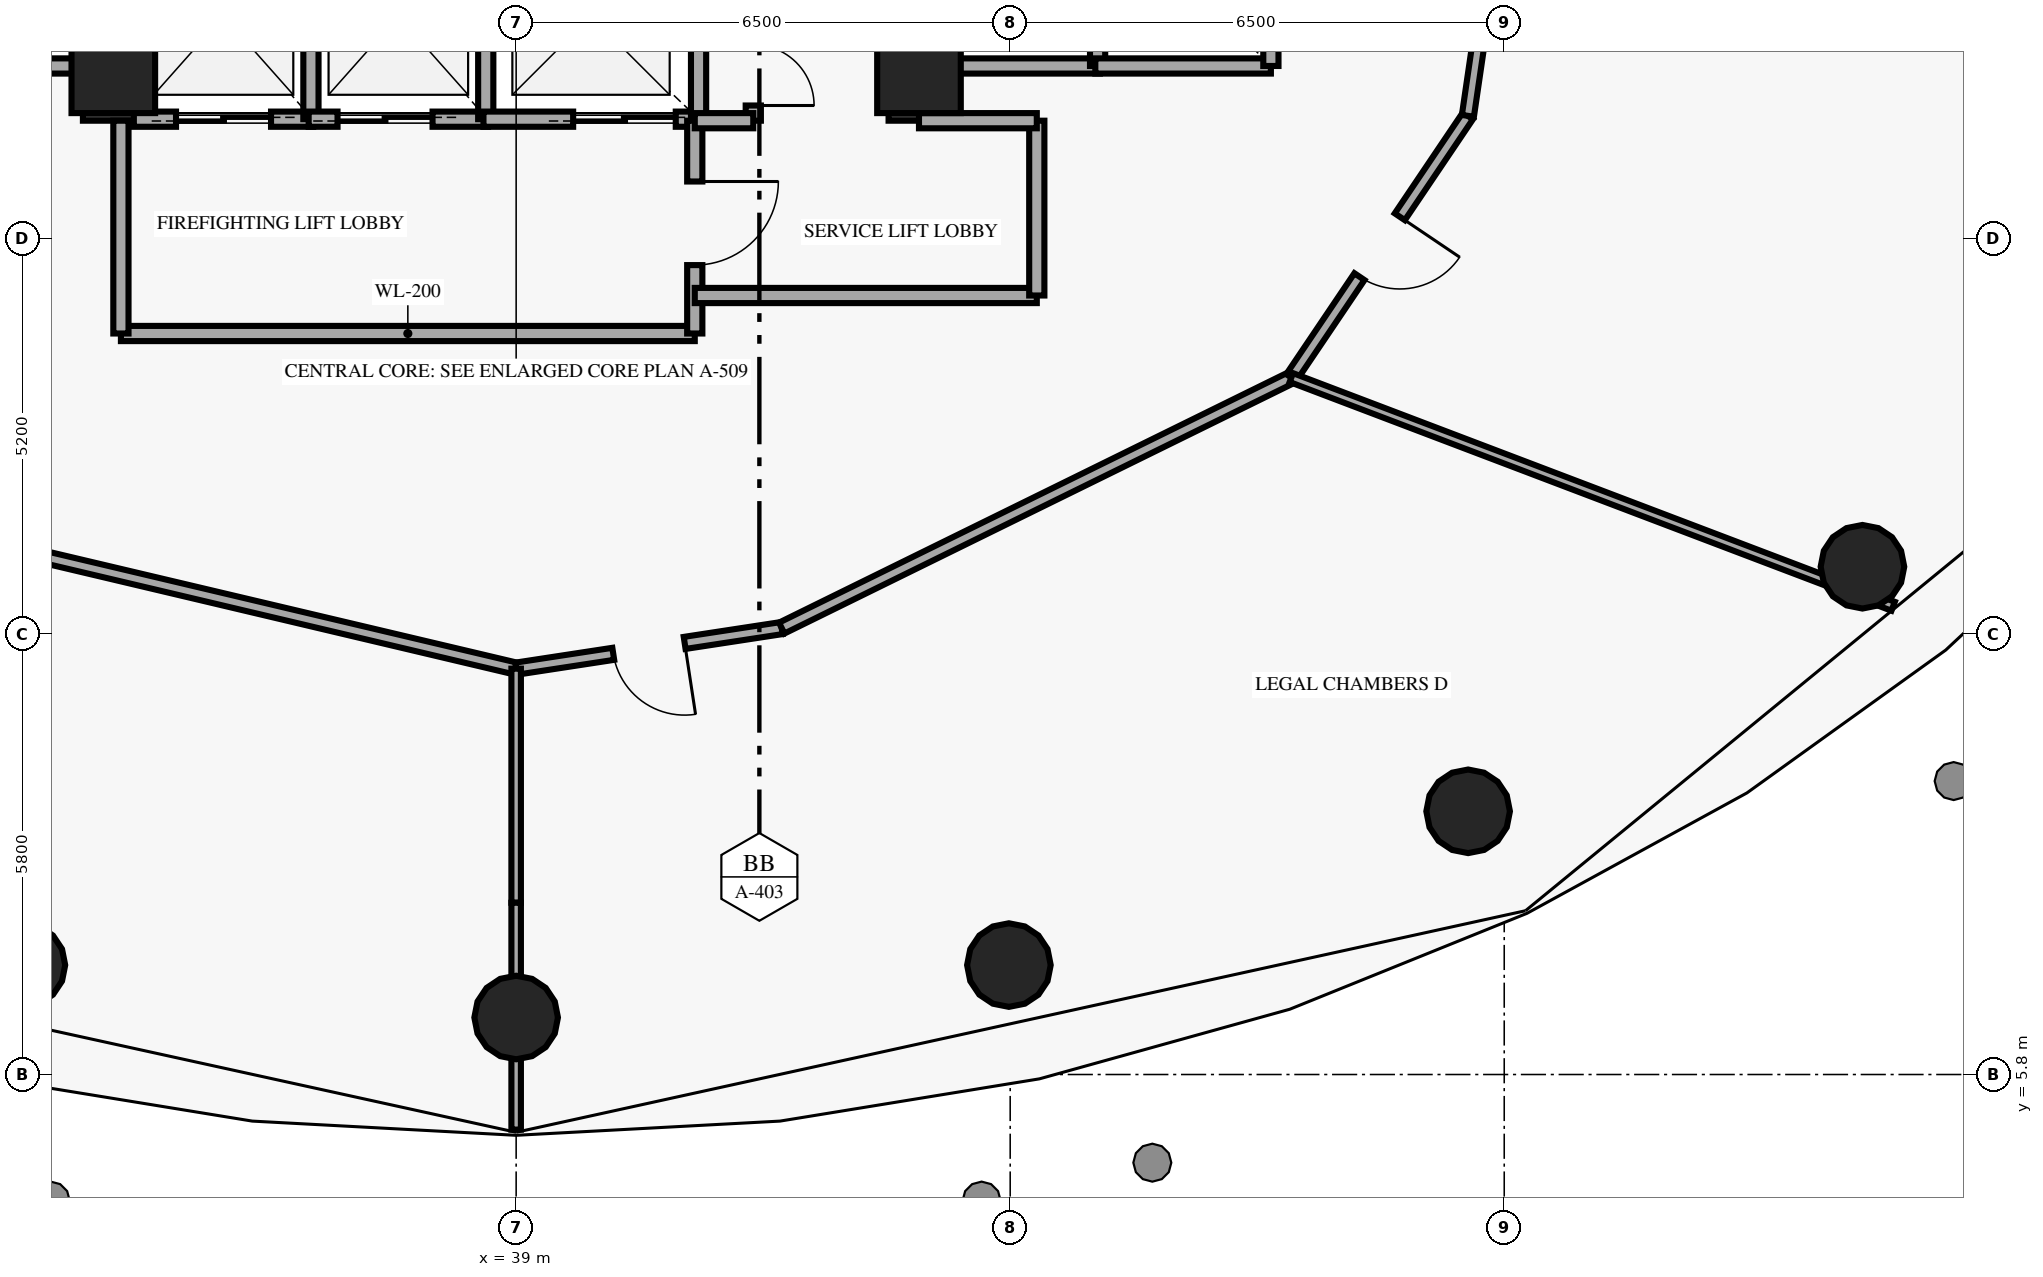
"""IFC4 building model, lengths in metres.
Left out: names, types, materials, properties, quantities, classifications, styles, units other than length and angle.
Written with IfcOpenShell. Run it as: python <this file> out.ifc"""

import sys

from ifc_helpers import new_model, si_unit, direction, frame, frame_2d, origin, origin_2d, place, context, subcontext, project, spatial, rectangle, circle, extrude, element, fill, save


model = new_model("IFC4")
c1 = context("Model", 3, precision=1e-05, world=origin(), true_north=direction((0.0, 1.0)))
c2 = subcontext(c1, "Body", "Model", "MODEL_VIEW")
j1 = project(units=[si_unit("LENGTHUNIT", "METRE"), si_unit("PLANEANGLEUNIT", "RADIAN")], contexts=[c1])
p1 = place(None, origin())
s1 = spatial("IfcSite", under=j1, at=p1, CompositionType="ELEMENT")
p2 = place(p1, origin())
s2 = spatial("IfcBuilding", under=s1, at=p2, CompositionType="ELEMENT")
p3 = place(p2, frame((0.0, 0.0, 53.4)))
s3 = spatial("IfcBuildingStorey", under=s2, at=p3, CompositionType="ELEMENT", Elevation=53.4)
for number, where, z_axis, x_axis in (
    (1, (33.7, 19.0, 0.0), (0.0, 0.0, 1.0), (1.0, 0.0, 0.0)),
    (2, (44.3, 19.0, 0.0), (0.0, 0.0, 1.0), (1.0, 0.0, 0.0)),
):
    element("IfcColumn", number, at=place(p3, frame(where, z_axis=z_axis, x_axis=x_axis)), inside=s3, PredefinedType="PILASTER", context=c2, shape_type="SweptSolid", body=[
        extrude(rectangle(XDim=1.1, YDim=1.1, at=origin_2d()), origin(), (0.0, 0.0, 1.0), 3.8),
    ])
for number, where, z_axis, x_axis in (
    (3, (32.517, 7.24, 0.0), (0.0, 0.0, 1.0), (1.0, 0.0, 0.0)),
    (4, (39.0, 6.55, 0.0), (0.0, 0.0, 1.0), (1.0, 0.0, 0.0)),
    (5, (45.483, 7.24, 0.0), (0.0, 0.0, 1.0), (1.0, 0.0, 0.0)),
    (6, (51.525, 9.263, 0.0), (0.0, 0.0, 1.0), (1.0, 0.0, 0.0)),
    (7, (56.713, 12.481, 0.0), (0.0, 0.0, 1.0), (1.0, 0.0, 0.0)),
):
    element("IfcColumn", number, at=place(p3, frame(where, z_axis=z_axis, x_axis=x_axis)), inside=s3, PredefinedType="COLUMN", context=c2, shape_type="SweptSolid", body=[
        extrude(circle(Radius=0.55, at=origin_2d()), origin(), (0.0, 0.0, 1.0), 3.8),
    ])
for number, where, z_axis, x_axis in (
    (8, (33.7, 18.35, 0.0), (0.0, 0.0, 1.0), (0.0, 1.0, 0.0)),
    (9, (44.3, 18.35, 0.0), (0.0, 0.0, 1.0), (0.0, 1.0, 0.0)),
):
    element("IfcWall", number, at=place(p3, frame(where, z_axis=z_axis, x_axis=x_axis)), inside=s3, PredefinedType="SHEAR", context=c2, shape_type="SweptSolid", body=[
        extrude(rectangle(XDim=2.95, YDim=0.8, at=frame_2d((1.475, 0.0))), origin(), (0.0, 0.0, 1.0), 3.8),
    ])
for number, where, z_axis, x_axis in (
    (10, (31.32, 19.07, 0.0), (0.0, 0.0, 1.0), (1.0, 0.0, 0.0)),
    (11, (44.57, 19.07, 0.0), (0.0, 0.0, 1.0), (1.0, 0.0, 0.0)),
):
    element("IfcWall", number, at=place(p3, frame(where, z_axis=z_axis, x_axis=x_axis)), inside=s3, PredefinedType="SOLIDWALL", context=c2, shape_type="SweptSolid", body=[
        extrude(rectangle(XDim=2.11, YDim=0.2, at=frame_2d((1.055, 0.0))), origin(), (0.0, 0.0, 1.0), 3.8),
    ])
for number, where, z_axis, x_axis in (
    (12, (46.65, 19.07, 0.0), (0.0, 0.0, 1.0), (0.0, 1.0, 0.0)),
    (13, (46.62, 19.07, 0.0), (0.0, 0.0, 1.0), (1.0, 0.0, 0.0)),
    (14, (48.93, 19.07, 0.0), (0.0, 0.0, 1.0), (0.0, 1.0, 0.0)),
):
    element("IfcWall", number, at=place(p3, frame(where, z_axis=z_axis, x_axis=x_axis)), inside=s3, PredefinedType="SOLIDWALL", context=c2, shape_type="SweptSolid", body=[
        extrude(rectangle(XDim=2.31, YDim=0.2, at=frame_2d((1.155, 0.0))), origin(), (0.0, 0.0, 1.0), 3.8),
    ])
p4 = place(p3, frame((33.97, 18.37, 0.0), z_axis=(0.0, 0.0, 1.0), x_axis=(1.0, 0.0, 0.0)))
e15 = element("IfcWall", 15, at=p4, inside=s3, PredefinedType="SOLIDWALL", context=c2, shape_type="SweptSolid", body=[
    extrude(rectangle(XDim=2.36, YDim=0.2, at=frame_2d((1.18, 0.0))), origin(), (0.0, 0.0, 1.0), 3.8),
])
p5 = place(p4, frame((0.555, 0.0, 0.0)))
e16 = element("IfcOpeningElement", 16, at=p5, cuts=e15, PredefinedType="OPENING", context=c2, shape_type="SweptSolid", body=[
    extrude(rectangle(XDim=1.25, YDim=2.2, at=frame_2d((0.625, 1.1))), frame((0.0, 0.11, 0.0), z_axis=(0.0, -1.0, 0.0), x_axis=(1.0, 0.0, 0.0)), (0.0, 0.0, 1.0), 0.22),
])
p6 = place(p3, frame((36.3, 18.37, 0.0), z_axis=(0.0, 0.0, 1.0), x_axis=(0.0, 1.0, 0.0)))
e17 = element("IfcWall", 17, at=p6, inside=s3, PredefinedType="SOLIDWALL", context=c2, shape_type="SweptSolid", body=[
    extrude(rectangle(XDim=2.71, YDim=0.2, at=frame_2d((1.355, 0.0))), origin(), (0.0, 0.0, 1.0), 3.8),
])
p7 = place(p3, frame((36.27, 18.37, 0.0), z_axis=(0.0, 0.0, 1.0), x_axis=(1.0, 0.0, 0.0)))
e18 = element("IfcWall", 18, at=p7, inside=s3, PredefinedType="SOLIDWALL", context=c2, shape_type="SweptSolid", body=[
    extrude(rectangle(XDim=2.36, YDim=0.2, at=frame_2d((1.18, 0.0))), origin(), (0.0, 0.0, 1.0), 3.8),
])
p8 = place(p7, frame((0.38, 0.0, 0.0)))
e19 = element("IfcOpeningElement", 19, at=p8, cuts=e18, PredefinedType="OPENING", context=c2, shape_type="SweptSolid", body=[
    extrude(rectangle(XDim=1.25, YDim=2.2, at=frame_2d((0.625, 1.1))), frame((0.0, 0.11, 0.0), z_axis=(0.0, -1.0, 0.0), x_axis=(1.0, 0.0, 0.0)), (0.0, 0.0, 1.0), 0.22),
])
p9 = place(p3, frame((38.6, 18.37, 0.0), z_axis=(0.0, 0.0, 1.0), x_axis=(0.0, 1.0, 0.0)))
e20 = element("IfcWall", 20, at=p9, inside=s3, PredefinedType="SOLIDWALL", context=c2, shape_type="SweptSolid", body=[
    extrude(rectangle(XDim=2.71, YDim=0.2, at=frame_2d((1.355, 0.0))), origin(), (0.0, 0.0, 1.0), 3.8),
])
p10 = place(p3, frame((38.57, 18.37, 0.0), z_axis=(0.0, 0.0, 1.0), x_axis=(1.0, 0.0, 0.0)))
e21 = element("IfcWall", 21, at=p10, inside=s3, PredefinedType="SOLIDWALL", context=c2, shape_type="SweptSolid", body=[
    extrude(rectangle(XDim=2.83, YDim=0.2, at=frame_2d((1.415, 0.0))), origin(), (0.0, 0.0, 1.0), 3.8),
])
p11 = place(p10, frame((1.18, 0.0, 0.0)))
e22 = element("IfcOpeningElement", 22, at=p11, cuts=e21, PredefinedType="OPENING", context=c2, shape_type="SweptSolid", body=[
    extrude(rectangle(XDim=1.35, YDim=2.18, at=frame_2d((0.675, 1.09))), frame((0.0, 0.11, 0.0), z_axis=(0.0, -1.0, 0.0), x_axis=(1.0, 0.0, 0.0)), (0.0, 0.0, 1.0), 0.22),
])
p12 = place(p3, frame((41.4, 18.37, 0.0), z_axis=(0.0, 0.0, 1.0), x_axis=(0.0, 1.0, 0.0)))
e23 = element("IfcWall", 23, at=p12, inside=s3, PredefinedType="SOLIDWALL", context=c2, shape_type="SweptSolid", body=[
    extrude(rectangle(XDim=2.71, YDim=0.2, at=frame_2d((1.355, 0.0))), origin(), (0.0, 0.0, 1.0), 3.8),
])
p13 = place(p3, frame((33.8, 15.55, 0.0), z_axis=(0.0, 0.0, 1.0), x_axis=(1.0, 0.0, 0.0)))
e24 = element("IfcWall", 24, at=p13, inside=s3, PredefinedType="SOLIDWALL", context=c2, shape_type="SweptSolid", body=[
    extrude(rectangle(XDim=7.55, YDim=0.2, at=frame_2d((3.775, 0.0))), origin(), (0.0, 0.0, 1.0), 3.8),
])
p14 = place(p3, frame((33.8, 15.55, 0.0), z_axis=(0.0, 0.0, 1.0), x_axis=(0.0, 1.0, 0.0)))
e25 = element("IfcWall", 25, at=p14, inside=s3, PredefinedType="SOLIDWALL", context=c2, shape_type="SweptSolid", body=[
    extrude(rectangle(XDim=2.8, YDim=0.2, at=frame_2d((1.4, 0.0))), origin(), (0.0, 0.0, 1.0), 3.8),
])
p15 = place(p3, frame((41.35, 15.55, 0.0), z_axis=(0.0, 0.0, 1.0), x_axis=(0.0, 1.0, 0.0)))
e26 = element("IfcWall", 26, at=p15, inside=s3, PredefinedType="SOLIDWALL", context=c2, shape_type="SweptSolid", body=[
    extrude(rectangle(XDim=2.8, YDim=0.2, at=frame_2d((1.4, 0.0))), origin(), (0.0, 0.0, 1.0), 3.8),
])
p16 = place(p15, frame((0.9, 0.0, 0.0)))
e27 = element("IfcOpeningElement", 27, at=p16, cuts=e26, PredefinedType="OPENING", context=c2, shape_type="SweptSolid", body=[
    extrude(rectangle(XDim=1.1, YDim=2.15, at=frame_2d((0.55, 1.075))), frame((0.0, 0.11, 0.0), z_axis=(0.0, -1.0, 0.0), x_axis=(1.0, 0.0, 0.0)), (0.0, 0.0, 1.0), 0.22),
])
p17 = place(p3, frame((41.35, 16.05, 0.0), z_axis=(0.0, 0.0, 1.0), x_axis=(1.0, 0.0, 0.0)))
e28 = element("IfcWall", 28, at=p17, inside=s3, PredefinedType="SOLIDWALL", context=c2, shape_type="SweptSolid", body=[
    extrude(rectangle(XDim=4.5, YDim=0.2, at=frame_2d((2.25, 0.0))), origin(), (0.0, 0.0, 1.0), 3.8),
])
p18 = place(p3, frame((45.85, 16.05, 0.0), z_axis=(0.0, 0.0, 1.0), x_axis=(0.0, 1.0, 0.0)))
e29 = element("IfcWall", 29, at=p18, inside=s3, PredefinedType="SOLIDWALL", context=c2, shape_type="SweptSolid", body=[
    extrude(rectangle(XDim=2.3, YDim=0.2, at=frame_2d((1.15, 0.0))), origin(), (0.0, 0.0, 1.0), 3.8),
])
p19 = place(p3, frame((44.3, 18.35, 0.0), z_axis=(0.0, 0.0, 1.0), x_axis=(1.0, 0.0, 0.0)))
e30 = element("IfcWall", 30, at=p19, inside=s3, PredefinedType="SOLIDWALL", context=c2, shape_type="SweptSolid", body=[
    extrude(rectangle(XDim=1.55, YDim=0.2, at=frame_2d((0.775, 0.0))), origin(), (0.0, 0.0, 1.0), 3.8),
])
p20 = place(p3, frame((42.12, 18.35, 0.0), z_axis=(0.0, 0.0, 1.0), x_axis=(0.0, 1.0, 0.0)))
e31 = element("IfcWall", 31, at=p20, inside=s3, PredefinedType="SOLIDWALL", context=c2, shape_type="SweptSolid", body=[
    extrude(rectangle(XDim=2.95, YDim=0.2, at=frame_2d((1.475, 0.0))), origin(), (0.0, 0.0, 1.0), 3.8),
])
p21 = place(p20, frame((0.2, 0.0, 0.0)))
e32 = element("IfcOpeningElement", 32, at=p21, cuts=e31, PredefinedType="OPENING", context=c2, shape_type="SweptSolid", body=[
    extrude(rectangle(XDim=0.8, YDim=2.05, at=frame_2d((0.4, 1.025))), frame((0.0, 0.11, 0.0), z_axis=(0.0, -1.0, 0.0), x_axis=(1.0, 0.0, 0.0)), (0.0, 0.0, 1.0), 0.22),
])
p22 = place(p3, frame((41.35, 18.35, 0.0), z_axis=(0.0, 0.0, 1.0), x_axis=(1.0, 0.0, 0.0)))
e33 = element("IfcWall", 33, at=p22, inside=s3, PredefinedType="SOLIDWALL", context=c2, shape_type="SweptSolid", body=[
    extrude(rectangle(XDim=0.77, YDim=0.2, at=frame_2d((0.385, 0.0))), origin(), (0.0, 0.0, 1.0), 3.8),
])
p23 = place(p3, frame((32.027, 12.79, 0.0), z_axis=(0.0, 0.0, 1.0), x_axis=(0.973121894952, -0.230290637162, 0.0)))
e34 = element("IfcWall", 34, at=p23, inside=s3, PredefinedType="PARTITIONING", context=c2, shape_type="SweptSolid", body=[
    extrude(rectangle(XDim=7.166, YDim=0.16, at=frame_2d((3.583, 0.0))), origin(), (0.0, 0.0, 1.0), 3.8),
])
p24 = place(p3, frame((42.494, 11.674, 0.0), z_axis=(0.0, 0.0, 1.0), x_axis=(-0.988513405878, -0.151133207467, 0.0)))
e35 = element("IfcWall", 35, at=p24, inside=s3, PredefinedType="PARTITIONING", context=c2, shape_type="SweptSolid", body=[
    extrude(rectangle(XDim=3.534, YDim=0.16, at=frame_2d((1.767, 0.0))), origin(), (0.0, 0.0, 1.0), 3.8),
])
p25 = place(p24, frame((1.292, 0.0, 0.0)))
e36 = element("IfcOpeningElement", 36, at=p25, cuts=e35, PredefinedType="OPENING", context=c2, shape_type="SweptSolid", body=[
    extrude(rectangle(XDim=0.95, YDim=2.15, at=frame_2d((0.475, 1.075))), frame((0.0, 0.09, 0.0), z_axis=(0.0, -1.0, 0.0), x_axis=(1.0, 0.0, 0.0)), (0.0, 0.0, 1.0), 0.18),
])
p26 = place(p3, frame((42.494, 11.674, 0.0), z_axis=(0.0, 0.0, 1.0), x_axis=(0.897439047431, 0.441138477291, 0.0)))
e37 = element("IfcWall", 37, at=p26, inside=s3, PredefinedType="PARTITIONING", context=c2, shape_type="SweptSolid", body=[
    extrude(rectangle(XDim=7.471, YDim=0.16, at=frame_2d((3.736, 0.0))), origin(), (0.0, 0.0, 1.0), 3.8),
])
p27 = place(p3, frame((51.522, 18.414, 0.0), z_axis=(0.0, 0.0, 1.0), x_axis=(-0.559181123292, -0.829045518264, 0.0)))
e38 = element("IfcWall", 38, at=p27, inside=s3, PredefinedType="PARTITIONING", context=c2, shape_type="SweptSolid", body=[
    extrude(rectangle(XDim=4.154, YDim=0.16, at=frame_2d((2.077, 0.0))), origin(), (0.0, 0.0, 1.0), 3.8),
])
p28 = place(p27, frame((1.602, 0.0, 0.0)))
e39 = element("IfcOpeningElement", 39, at=p28, cuts=e38, PredefinedType="OPENING", context=c2, shape_type="SweptSolid", body=[
    extrude(rectangle(XDim=0.95, YDim=2.15, at=frame_2d((0.475, 1.075))), frame((0.0, 0.09, 0.0), z_axis=(0.0, -1.0, 0.0), x_axis=(1.0, 0.0, 0.0)), (0.0, 0.0, 1.0), 0.18),
])
p29 = place(p3, frame((51.522, 18.414, 0.0), z_axis=(0.0, 0.0, 1.0), x_axis=(0.14489272673, 0.989447369869, 0.0)))
e40 = element("IfcWall", 40, at=p29, inside=s3, PredefinedType="PARTITIONING", context=c2, shape_type="SweptSolid", body=[
    extrude(rectangle(XDim=8.475, YDim=0.16, at=frame_2d((4.238, 0.0))), origin(), (0.0, 0.0, 1.0), 3.8),
])
p30 = place(p3, frame((39.0, 11.14, 0.0), z_axis=(0.0, 0.0, 1.0), x_axis=(0.0, -1.0, 0.0)))
e41 = element("IfcWall", 41, at=p30, inside=s3, PredefinedType="PARTITIONING", context=c2, shape_type="SweptSolid", body=[
    extrude(rectangle(XDim=3.08, YDim=0.125, at=frame_2d((1.54, 0.0))), origin(), (0.0, 0.0, 1.0), 3.8),
])
p31 = place(p3, frame((39.0, 8.06, 0.0), z_axis=(0.0, 0.0, 1.0), x_axis=(0.0, -1.0, 0.0)))
e42 = element("IfcWall", 42, at=p31, inside=s3, PredefinedType="PARTITIONING", context=c2, shape_type="SweptSolid", body=[
    extrude(rectangle(XDim=1.519, YDim=0.125, at=frame_2d((0.76, 0.0))), origin(), (0.0, 0.0, 1.0), 2.94),
])
p32 = place(p3, frame((39.0, 6.541, 0.0), z_axis=(0.0, 0.0, 1.0), x_axis=(0.0, -1.0, 0.0)))
e43 = element("IfcWall", 43, at=p32, inside=s3, PredefinedType="PARTITIONING", context=c2, shape_type="SweptSolid", body=[
    extrude(rectangle(XDim=1.466, YDim=0.125, at=frame_2d((0.733, 0.0))), origin(), (0.0, 0.0, 1.0), 3.8),
])
p33 = place(p3, frame((49.199, 14.97, 0.0), z_axis=(0.0, 0.0, 1.0), x_axis=(0.934775541041, -0.355238916605, 0.0)))
e44 = element("IfcWall", 44, at=p33, inside=s3, PredefinedType="PARTITIONING", context=c2, shape_type="SweptSolid", body=[
    extrude(rectangle(XDim=8.47, YDim=0.125, at=frame_2d((4.235, 0.0))), origin(), (0.0, 0.0, 1.0), 3.8),
])
p34 = place(p5, origin())
e45 = element("IfcDoor", 45, at=p34, inside=s3, OperationType="DOUBLE_DOOR_SLIDING", PredefinedType="DOOR", context=c2, shape_type="SweptSolid", body=[
    extrude(rectangle(XDim=1.25, YDim=2.2, at=frame_2d((0.625, 1.1))), frame((0.0, 0.025, 0.0), z_axis=(0.0, -1.0, 0.0), x_axis=(1.0, 0.0, 0.0)), (0.0, 0.0, 1.0), 0.05),
])
fill(e16, e45)
p35 = place(p8, origin())
e46 = element("IfcDoor", 46, at=p35, inside=s3, OperationType="DOUBLE_DOOR_SLIDING", PredefinedType="DOOR", context=c2, shape_type="SweptSolid", body=[
    extrude(rectangle(XDim=1.25, YDim=2.2, at=frame_2d((0.625, 1.1))), frame((0.0, 0.025, 0.0), z_axis=(0.0, -1.0, 0.0), x_axis=(1.0, 0.0, 0.0)), (0.0, 0.0, 1.0), 0.05),
])
fill(e19, e46)
p36 = place(p11, origin())
e47 = element("IfcDoor", 47, at=p36, inside=s3, OperationType="DOUBLE_DOOR_SLIDING", PredefinedType="DOOR", context=c2, shape_type="SweptSolid", body=[
    extrude(rectangle(XDim=1.35, YDim=2.18, at=frame_2d((0.675, 1.09))), frame((0.0, 0.025, 0.0), z_axis=(0.0, -1.0, 0.0), x_axis=(1.0, 0.0, 0.0)), (0.0, 0.0, 1.0), 0.05),
])
fill(e22, e47)
p37 = place(p16, origin())
e48 = element("IfcDoor", 48, at=p37, inside=s3, OperationType="SINGLE_SWING_RIGHT", PredefinedType="DOOR", context=c2, shape_type="SweptSolid", body=[
    extrude(rectangle(XDim=1.1, YDim=2.15, at=frame_2d((0.55, 1.075))), frame((0.0, 0.025, 0.0), z_axis=(0.0, -1.0, 0.0), x_axis=(1.0, 0.0, 0.0)), (0.0, 0.0, 1.0), 0.05),
])
fill(e27, e48)
p38 = place(p21, origin())
e49 = element("IfcDoor", 49, at=p38, inside=s3, OperationType="SINGLE_SWING_LEFT", PredefinedType="DOOR", context=c2, shape_type="SweptSolid", body=[
    extrude(rectangle(XDim=0.8, YDim=2.05, at=frame_2d((0.4, 1.025))), frame((0.0, 0.025, 0.0), z_axis=(0.0, -1.0, 0.0), x_axis=(1.0, 0.0, 0.0)), (0.0, 0.0, 1.0), 0.05),
])
fill(e32, e49)
p39 = place(p25, origin())
e50 = element("IfcDoor", 50, at=p39, inside=s3, OperationType="SINGLE_SWING_LEFT", PredefinedType="DOOR", context=c2, shape_type="SweptSolid", body=[
    extrude(rectangle(XDim=0.95, YDim=2.15, at=frame_2d((0.475, 1.075))), frame((0.0, 0.025, 0.0), z_axis=(0.0, -1.0, 0.0), x_axis=(1.0, 0.0, 0.0)), (0.0, 0.0, 1.0), 0.05),
])
fill(e36, e50)
p40 = place(p28, origin())
e51 = element("IfcDoor", 51, at=p40, inside=s3, OperationType="SINGLE_SWING_LEFT", PredefinedType="DOOR", context=c2, shape_type="SweptSolid", body=[
    extrude(rectangle(XDim=0.95, YDim=2.15, at=frame_2d((0.475, 1.075))), frame((0.0, 0.025, 0.0), z_axis=(0.0, -1.0, 0.0), x_axis=(1.0, 0.0, 0.0)), (0.0, 0.0, 1.0), 0.05),
])
fill(e39, e51)
save(model, sys.argv[1])
